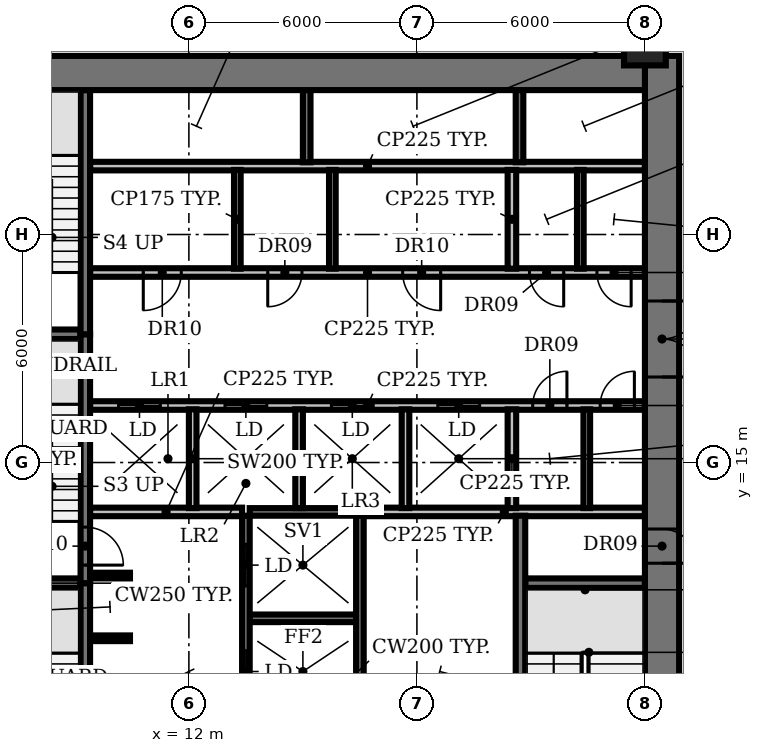
"""IFC4 building model, lengths in metres.
Left out: names, types, materials, properties, quantities, classifications, styles, units other than length and angle.
Written with IfcOpenShell. Run it as: python <this file> out.ifc"""

import sys

from ifc_helpers import new_model, si_unit, direction, frame, frame_2d, origin, origin_2d, place, context, subcontext, project, spatial, rectangle, circle, extrude, element, fill, save


model = new_model("IFC4")
c1 = context("Model", 3, precision=1e-05, world=origin(), true_north=direction((0.0, 1.0)))
c2 = subcontext(c1, "Body", "Model", "MODEL_VIEW")
j1 = project(units=[si_unit("LENGTHUNIT", "METRE"), si_unit("PLANEANGLEUNIT", "RADIAN")], contexts=[c1])
p1 = place(None, origin())
s1 = spatial("IfcSite", under=j1, at=p1, CompositionType="ELEMENT")
p2 = place(p1, origin())
s2 = spatial("IfcBuilding", under=s1, at=p2, CompositionType="ELEMENT")
p3 = place(p2, frame((0.0, 0.0, 15.5)))
s3 = spatial("IfcBuildingStorey", under=s2, at=p3, CompositionType="ELEMENT", Elevation=15.5)
p4 = place(p3, frame((24.0, 26.0, 0.0), z_axis=(0.0, 0.0, 1.0), x_axis=(1.0, 0.0, 0.0)))
e1 = element("IfcColumn", 1, at=p4, inside=s3, PredefinedType="COLUMN", context=c2, shape_type="SweptSolid", body=[
    extrude(circle(Radius=0.55, at=origin_2d()), origin(), (0.0, 0.0, 1.0), 4.15),
])
p5 = place(p3, frame((9.4, 10.375, 0.0), z_axis=(0.0, 0.0, 1.0), x_axis=(1.0, 0.0, 0.0)))
e2 = element("IfcWall", 2, at=p5, inside=s3, PredefinedType="SHEAR", context=c2, shape_type="SweptSolid", body=[
    extrude(rectangle(XDim=1.05, YDim=0.15, at=frame_2d((0.525, 0.0))), origin(), (0.0, 0.0, 1.0), 4.15),
])
p6 = place(p3, frame((13.6, 10.9, 0.0), z_axis=(0.0, 0.0, 1.0), x_axis=(1.0, 0.0, 0.0)))
e3 = element("IfcWall", 3, at=p6, inside=s3, PredefinedType="SHEAR", context=c2, shape_type="SweptSolid", body=[
    extrude(rectangle(XDim=2.8, YDim=0.2, at=frame_2d((1.4, 0.0))), origin(), (0.0, 0.0, 1.0), 4.15),
])
for number, where, z_axis, x_axis in (
    (4, (6.0, 11.825, 0.0), (0.0, 0.0, 1.0), (1.0, 0.0, 0.0)),
    (5, (20.85, 11.825, 0.0), (0.0, 0.0, 1.0), (1.0, 0.0, 0.0)),
):
    element("IfcWall", number, at=place(p3, frame(where, z_axis=z_axis, x_axis=x_axis)), inside=s3, PredefinedType="SHEAR", context=c2, shape_type="SweptSolid", body=[
        extrude(rectangle(XDim=3.15, YDim=0.25, at=frame_2d((1.575, 0.0))), origin(), (0.0, 0.0, 1.0), 4.15),
    ])
p7 = place(p3, frame((9.4, 12.025, 0.0), z_axis=(0.0, 0.0, 1.0), x_axis=(1.0, 0.0, 0.0)))
e6 = element("IfcWall", 6, at=p7, inside=s3, PredefinedType="SHEAR", context=c2, shape_type="SweptSolid", body=[
    extrude(rectangle(XDim=1.05, YDim=0.15, at=frame_2d((0.525, 0.0))), origin(), (0.0, 0.0, 1.0), 4.15),
])
p8 = place(p3, frame((9.4, 13.7, 0.0), z_axis=(0.0, 0.0, 1.0), x_axis=(1.0, 0.0, 0.0)))
e7 = element("IfcWall", 7, at=p8, inside=s3, PredefinedType="PARTITIONING", context=c2, shape_type="SweptSolid", body=[
    extrude(rectangle(XDim=4.0, YDim=0.225, at=frame_2d((2.0, 0.0))), origin(), (0.0, 0.0, 1.0), 4.15),
])
p9 = place(p3, frame((13.6, 13.7, 0.0), z_axis=(0.0, 0.0, 1.0), x_axis=(1.0, 0.0, 0.0)))
e8 = element("IfcWall", 8, at=p9, inside=s3, PredefinedType="SHEAR", context=c2, shape_type="SweptSolid", body=[
    extrude(rectangle(XDim=2.8, YDim=0.2, at=frame_2d((1.4, 0.0))), origin(), (0.0, 0.0, 1.0), 4.15),
])
p10 = place(p3, frame((16.6, 13.7, 0.0), z_axis=(0.0, 0.0, 1.0), x_axis=(1.0, 0.0, 0.0)))
e9 = element("IfcWall", 9, at=p10, inside=s3, PredefinedType="PARTITIONING", context=c2, shape_type="SweptSolid", body=[
    extrude(rectangle(XDim=7.4, YDim=0.225, at=frame_2d((3.7, 0.0))), origin(), (0.0, 0.0, 1.0), 4.15),
])
p11 = place(p3, frame((9.4, 16.5, 0.0), z_axis=(0.0, 0.0, 1.0), x_axis=(1.0, 0.0, 0.0)))
e10 = element("IfcWall", 10, at=p11, inside=s3, PredefinedType="PARTITIONING", context=c2, shape_type="SweptSolid", body=[
    extrude(rectangle(XDim=14.6, YDim=0.225, at=frame_2d((7.3, 0.0))), origin(), (0.0, 0.0, 1.0), 4.15),
])
p12 = place(p11, frame((0.75, 0.0, 0.0)))
e11 = element("IfcOpeningElement", 11, at=p12, cuts=e10, PredefinedType="OPENING", context=c2, shape_type="SweptSolid", body=[
    extrude(rectangle(XDim=1.1, YDim=2.1, at=frame_2d((0.55, 1.05))), frame((0.0, 0.123, 0.0), z_axis=(0.0, -1.0, 0.0), x_axis=(1.0, 0.0, 0.0)), (0.0, 0.0, 1.0), 0.245),
])
p13 = place(p11, frame((3.55, 0.0, 0.0)))
e12 = element("IfcOpeningElement", 12, at=p13, cuts=e10, PredefinedType="OPENING", context=c2, shape_type="SweptSolid", body=[
    extrude(rectangle(XDim=1.1, YDim=2.1, at=frame_2d((0.55, 1.05))), frame((0.0, 0.123, 0.0), z_axis=(0.0, -1.0, 0.0), x_axis=(1.0, 0.0, 0.0)), (0.0, 0.0, 1.0), 0.245),
])
p14 = place(p11, frame((6.35, 0.0, 0.0)))
e13 = element("IfcOpeningElement", 13, at=p14, cuts=e10, PredefinedType="OPENING", context=c2, shape_type="SweptSolid", body=[
    extrude(rectangle(XDim=1.1, YDim=2.1, at=frame_2d((0.55, 1.05))), frame((0.0, 0.123, 0.0), z_axis=(0.0, -1.0, 0.0), x_axis=(1.0, 0.0, 0.0)), (0.0, 0.0, 1.0), 0.245),
])
p15 = place(p11, frame((9.15, 0.0, 0.0)))
e14 = element("IfcOpeningElement", 14, at=p15, cuts=e10, PredefinedType="OPENING", context=c2, shape_type="SweptSolid", body=[
    extrude(rectangle(XDim=1.1, YDim=2.1, at=frame_2d((0.55, 1.05))), frame((0.0, 0.123, 0.0), z_axis=(0.0, -1.0, 0.0), x_axis=(1.0, 0.0, 0.0)), (0.0, 0.0, 1.0), 0.245),
])
p16 = place(p11, frame((11.647, 0.0, 0.0)))
e15 = element("IfcOpeningElement", 15, at=p16, cuts=e10, PredefinedType="OPENING", context=c2, shape_type="SweptSolid", body=[
    extrude(rectangle(XDim=0.9, YDim=2.1, at=frame_2d((0.45, 1.05))), frame((0.0, 0.123, 0.0), z_axis=(0.0, -1.0, 0.0), x_axis=(1.0, 0.0, 0.0)), (0.0, 0.0, 1.0), 0.245),
])
p17 = place(p11, frame((13.423, 0.0, 0.0)))
e16 = element("IfcOpeningElement", 16, at=p17, cuts=e10, PredefinedType="OPENING", context=c2, shape_type="SweptSolid", body=[
    extrude(rectangle(XDim=0.9, YDim=2.1, at=frame_2d((0.45, 1.05))), frame((0.0, 0.123, 0.0), z_axis=(0.0, -1.0, 0.0), x_axis=(1.0, 0.0, 0.0)), (0.0, 0.0, 1.0), 0.245),
])
p18 = place(p3, frame((6.0, 18.375, 0.0), z_axis=(0.0, 0.0, 1.0), x_axis=(1.0, 0.0, 0.0)))
e17 = element("IfcWall", 17, at=p18, inside=s3, PredefinedType="SHEAR", context=c2, shape_type="SweptSolid", body=[
    extrude(rectangle(XDim=3.15, YDim=0.25, at=frame_2d((1.575, 0.0))), origin(), (0.0, 0.0, 1.0), 4.15),
])
p19 = place(p3, frame((24.0, 20.0, 0.0), z_axis=(0.0, 0.0, 1.0), x_axis=(-1.0, 0.0, 0.0)))
e18 = element("IfcWall", 18, at=p19, inside=s3, PredefinedType="PARTITIONING", context=c2, shape_type="SweptSolid", body=[
    extrude(rectangle(XDim=14.6, YDim=0.225, at=frame_2d((7.3, 0.0))), origin(), (0.0, 0.0, 1.0), 4.15),
])
p20 = place(p19, frame((12.2, 0.0, 0.0)))
e19 = element("IfcOpeningElement", 19, at=p20, cuts=e18, PredefinedType="OPENING", context=c2, shape_type="SweptSolid", body=[
    extrude(rectangle(XDim=1.0, YDim=2.1, at=frame_2d((0.5, 1.05))), frame((0.0, 0.123, 0.0), z_axis=(0.0, -1.0, 0.0), x_axis=(1.0, 0.0, 0.0)), (0.0, 0.0, 1.0), 0.245),
])
p21 = place(p19, frame((9.025, 0.0, 0.0)))
e20 = element("IfcOpeningElement", 20, at=p21, cuts=e18, PredefinedType="OPENING", context=c2, shape_type="SweptSolid", body=[
    extrude(rectangle(XDim=0.9, YDim=2.1, at=frame_2d((0.45, 1.05))), frame((0.0, 0.123, 0.0), z_axis=(0.0, -1.0, 0.0), x_axis=(1.0, 0.0, 0.0)), (0.0, 0.0, 1.0), 0.245),
])
p22 = place(p19, frame((5.375, 0.0, 0.0)))
e21 = element("IfcOpeningElement", 21, at=p22, cuts=e18, PredefinedType="OPENING", context=c2, shape_type="SweptSolid", body=[
    extrude(rectangle(XDim=1.0, YDim=2.1, at=frame_2d((0.5, 1.05))), frame((0.0, 0.123, 0.0), z_axis=(0.0, -1.0, 0.0), x_axis=(1.0, 0.0, 0.0)), (0.0, 0.0, 1.0), 0.245),
])
p23 = place(p19, frame((2.137, 0.0, 0.0)))
e22 = element("IfcOpeningElement", 22, at=p23, cuts=e18, PredefinedType="OPENING", context=c2, shape_type="SweptSolid", body=[
    extrude(rectangle(XDim=0.9, YDim=2.1, at=frame_2d((0.45, 1.05))), frame((0.0, 0.123, 0.0), z_axis=(0.0, -1.0, 0.0), x_axis=(1.0, 0.0, 0.0)), (0.0, 0.0, 1.0), 0.245),
])
p24 = place(p19, frame((0.363, 0.0, 0.0)))
e23 = element("IfcOpeningElement", 23, at=p24, cuts=e18, PredefinedType="OPENING", context=c2, shape_type="SweptSolid", body=[
    extrude(rectangle(XDim=0.9, YDim=2.1, at=frame_2d((0.45, 1.05))), frame((0.0, 0.123, 0.0), z_axis=(0.0, -1.0, 0.0), x_axis=(1.0, 0.0, 0.0)), (0.0, 0.0, 1.0), 0.245),
])
p25 = place(p3, frame((9.4, 22.8, 0.0), z_axis=(0.0, 0.0, 1.0), x_axis=(1.0, 0.0, 0.0)))
e24 = element("IfcWall", 24, at=p25, inside=s3, PredefinedType="PARTITIONING", context=c2, shape_type="SweptSolid", body=[
    extrude(rectangle(XDim=14.6, YDim=0.225, at=frame_2d((7.3, 0.0))), origin(), (0.0, 0.0, 1.0), 4.15),
])
p26 = place(p3, frame((9.275, 11.825, 0.0), z_axis=(0.0, 0.0, 1.0), x_axis=(0.0, -1.0, 0.0)))
e25 = element("IfcWall", 25, at=p26, inside=s3, PredefinedType="SHEAR", context=c2, shape_type="SweptSolid", body=[
    extrude(rectangle(XDim=6.425, YDim=0.25, at=frame_2d((3.212, 0.0))), origin(), (0.0, 0.0, 1.0), 4.15),
])
p27 = place(p26, frame((5.075, 0.0, 0.0)))
e26 = element("IfcOpeningElement", 26, at=p27, cuts=e25, PredefinedType="OPENING", context=c2, shape_type="SweptSolid", body=[
    extrude(rectangle(XDim=1.0, YDim=2.1, at=frame_2d((0.5, 1.05))), frame((0.0, 0.135, 0.0), z_axis=(0.0, -1.0, 0.0), x_axis=(1.0, 0.0, 0.0)), (0.0, 0.0, 1.0), 0.27),
])
p28 = place(p3, frame((9.275, 18.375, 0.0), z_axis=(0.0, 0.0, 1.0), x_axis=(0.0, -1.0, 0.0)))
e27 = element("IfcWall", 27, at=p28, inside=s3, PredefinedType="SHEAR", context=c2, shape_type="SweptSolid", body=[
    extrude(rectangle(XDim=6.55, YDim=0.25, at=frame_2d((3.275, 0.0))), origin(), (0.0, 0.0, 1.0), 4.15),
])
p29 = place(p28, frame((5.075, 0.0, 0.0)))
e28 = element("IfcOpeningElement", 28, at=p29, cuts=e27, PredefinedType="OPENING", context=c2, shape_type="SweptSolid", body=[
    extrude(rectangle(XDim=1.0, YDim=2.1, at=frame_2d((0.5, 1.05))), frame((0.0, 0.135, 0.0), z_axis=(0.0, -1.0, 0.0), x_axis=(1.0, 0.0, 0.0)), (0.0, 0.0, 1.0), 0.27),
])
p30 = place(p3, frame((9.275, 18.375, 0.0), z_axis=(0.0, 0.0, 1.0), x_axis=(0.0, 1.0, 0.0)))
e29 = element("IfcWall", 29, at=p30, inside=s3, PredefinedType="SHEAR", context=c2, shape_type="SweptSolid", body=[
    extrude(rectangle(XDim=6.425, YDim=0.25, at=frame_2d((3.212, 0.0))), origin(), (0.0, 0.0, 1.0), 4.15),
])
p31 = place(p3, frame((12.1, 13.8, 0.0), z_axis=(0.0, 0.0, 1.0), x_axis=(0.0, 1.0, 0.0)))
e30 = element("IfcWall", 30, at=p31, inside=s3, PredefinedType="SOLIDWALL", context=c2, shape_type="SweptSolid", body=[
    extrude(rectangle(XDim=2.6, YDim=0.2, at=frame_2d((1.3, 0.0))), origin(), (0.0, 0.0, 1.0), 4.15),
])
p32 = place(p3, frame((13.275, 20.1, 0.0), z_axis=(0.0, 0.0, 1.0), x_axis=(0.0, 1.0, 0.0)))
e31 = element("IfcWall", 31, at=p32, inside=s3, PredefinedType="PARTITIONING", context=c2, shape_type="SweptSolid", body=[
    extrude(rectangle(XDim=2.6, YDim=0.175, at=frame_2d((1.3, 0.0))), origin(), (0.0, 0.0, 1.0), 4.15),
])
p33 = place(p3, frame((13.5, 5.4, 0.0), z_axis=(0.0, 0.0, 1.0), x_axis=(0.0, 1.0, 0.0)))
e32 = element("IfcWall", 32, at=p33, inside=s3, PredefinedType="SHEAR", context=c2, shape_type="SweptSolid", body=[
    extrude(rectangle(XDim=8.2, YDim=0.2, at=frame_2d((4.1, 0.0))), origin(), (0.0, 0.0, 1.0), 4.15),
])
p34 = place(p33, frame((0.75, 0.0, 0.0)))
e33 = element("IfcOpeningElement", 33, at=p34, cuts=e32, PredefinedType="OPENING", context=c2, shape_type="SweptSolid", body=[
    extrude(rectangle(XDim=1.1, YDim=2.1, at=frame_2d((0.55, 1.05))), frame((0.0, 0.11, 0.0), z_axis=(0.0, -1.0, 0.0), x_axis=(1.0, 0.0, 0.0)), (0.0, 0.0, 1.0), 0.22),
])
p35 = place(p33, frame((3.55, 0.0, 0.0)))
e34 = element("IfcOpeningElement", 34, at=p35, cuts=e32, PredefinedType="OPENING", context=c2, shape_type="SweptSolid", body=[
    extrude(rectangle(XDim=1.1, YDim=2.1, at=frame_2d((0.55, 1.05))), frame((0.0, 0.11, 0.0), z_axis=(0.0, -1.0, 0.0), x_axis=(1.0, 0.0, 0.0)), (0.0, 0.0, 1.0), 0.22),
])
p36 = place(p33, frame((6.35, 0.0, 0.0)))
e35 = element("IfcOpeningElement", 35, at=p36, cuts=e32, PredefinedType="OPENING", context=c2, shape_type="SweptSolid", body=[
    extrude(rectangle(XDim=1.1, YDim=2.1, at=frame_2d((0.55, 1.05))), frame((0.0, 0.11, 0.0), z_axis=(0.0, -1.0, 0.0), x_axis=(1.0, 0.0, 0.0)), (0.0, 0.0, 1.0), 0.22),
])
p37 = place(p3, frame((14.9, 13.8, 0.0), z_axis=(0.0, 0.0, 1.0), x_axis=(0.0, 1.0, 0.0)))
e36 = element("IfcWall", 36, at=p37, inside=s3, PredefinedType="SOLIDWALL", context=c2, shape_type="SweptSolid", body=[
    extrude(rectangle(XDim=2.6, YDim=0.2, at=frame_2d((1.3, 0.0))), origin(), (0.0, 0.0, 1.0), 4.15),
])
p38 = place(p3, frame((15.1, 22.9, 0.0), z_axis=(0.0, 0.0, 1.0), x_axis=(0.0, 1.0, 0.0)))
e37 = element("IfcWall", 37, at=p38, inside=s3, PredefinedType="SHEAR", context=c2, shape_type="SweptSolid", body=[
    extrude(rectangle(XDim=1.9, YDim=0.2, at=frame_2d((0.95, 0.0))), origin(), (0.0, 0.0, 1.0), 4.15),
])
p39 = place(p3, frame((15.775, 20.1, 0.0), z_axis=(0.0, 0.0, 1.0), x_axis=(0.0, 1.0, 0.0)))
e38 = element("IfcWall", 38, at=p39, inside=s3, PredefinedType="PARTITIONING", context=c2, shape_type="SweptSolid", body=[
    extrude(rectangle(XDim=2.6, YDim=0.175, at=frame_2d((1.3, 0.0))), origin(), (0.0, 0.0, 1.0), 4.15),
])
p40 = place(p3, frame((16.5, 5.4, 0.0), z_axis=(0.0, 0.0, 1.0), x_axis=(0.0, 1.0, 0.0)))
e39 = element("IfcWall", 39, at=p40, inside=s3, PredefinedType="SHEAR", context=c2, shape_type="SweptSolid", body=[
    extrude(rectangle(XDim=8.2, YDim=0.2, at=frame_2d((4.1, 0.0))), origin(), (0.0, 0.0, 1.0), 4.15),
])
p41 = place(p3, frame((17.7, 13.8, 0.0), z_axis=(0.0, 0.0, 1.0), x_axis=(0.0, 1.0, 0.0)))
e40 = element("IfcWall", 40, at=p41, inside=s3, PredefinedType="SOLIDWALL", context=c2, shape_type="SweptSolid", body=[
    extrude(rectangle(XDim=2.6, YDim=0.2, at=frame_2d((1.3, 0.0))), origin(), (0.0, 0.0, 1.0), 4.15),
])
for number, where, z_axis, x_axis in (
    (41, (20.5, 13.8, 0.0), (0.0, 0.0, 1.0), (0.0, 1.0, 0.0)),
    (42, (20.5, 20.1, 0.0), (0.0, 0.0, 1.0), (0.0, 1.0, 0.0)),
):
    element("IfcWall", number, at=place(p3, frame(where, z_axis=z_axis, x_axis=x_axis)), inside=s3, PredefinedType="PARTITIONING", context=c2, shape_type="SweptSolid", body=[
        extrude(rectangle(XDim=2.6, YDim=0.225, at=frame_2d((1.3, 0.0))), origin(), (0.0, 0.0, 1.0), 4.15),
    ])
p42 = place(p3, frame((20.7, 22.9, 0.0), z_axis=(0.0, 0.0, 1.0), x_axis=(0.0, 1.0, 0.0)))
e43 = element("IfcWall", 43, at=p42, inside=s3, PredefinedType="SHEAR", context=c2, shape_type="SweptSolid", body=[
    extrude(rectangle(XDim=1.9, YDim=0.2, at=frame_2d((0.95, 0.0))), origin(), (0.0, 0.0, 1.0), 4.15),
])
p43 = place(p3, frame((20.725, 5.4, 0.0), z_axis=(0.0, 0.0, 1.0), x_axis=(0.0, 1.0, 0.0)))
e44 = element("IfcWall", 44, at=p43, inside=s3, PredefinedType="SHEAR", context=c2, shape_type="SweptSolid", body=[
    extrude(rectangle(XDim=8.2, YDim=0.25, at=frame_2d((4.1, 0.0))), origin(), (0.0, 0.0, 1.0), 4.15),
])
for number, where, z_axis, x_axis in (
    (45, (22.3, 20.1, 0.0), (0.0, 0.0, 1.0), (0.0, 1.0, 0.0)),
    (46, (22.47, 13.8, 0.0), (0.0, 0.0, 1.0), (0.0, 1.0, 0.0)),
):
    element("IfcWall", number, at=place(p3, frame(where, z_axis=z_axis, x_axis=x_axis)), inside=s3, PredefinedType="PARTITIONING", context=c2, shape_type="SweptSolid", body=[
        extrude(rectangle(XDim=2.6, YDim=0.175, at=frame_2d((1.3, 0.0))), origin(), (0.0, 0.0, 1.0), 4.15),
    ])
p44 = place(p3, frame((24.45, 25.7, 0.0), z_axis=(0.0, 0.0, 1.0), x_axis=(0.0, -1.0, 0.0)))
e47 = element("IfcWall", 47, at=p44, inside=s3, PredefinedType="SHEAR", context=c2, shape_type="SweptSolid", body=[
    extrude(rectangle(XDim=21.2, YDim=0.9, at=frame_2d((10.6, 0.0))), origin(), (0.0, 0.0, 1.0), 4.15),
])
p45 = place(p44, frame((12.45, 0.0, 0.0)))
e48 = element("IfcOpeningElement", 48, at=p45, cuts=e47, PredefinedType="OPENING", context=c2, shape_type="SweptSolid", body=[
    extrude(rectangle(XDim=0.9, YDim=2.1, at=frame_2d((0.45, 1.05))), frame((0.0, 0.46, 0.0), z_axis=(0.0, -1.0, 0.0), x_axis=(1.0, 0.0, 0.0)), (0.0, 0.0, 1.0), 0.92),
])
p46 = place(p44, frame((6.45, 0.0, 0.0)))
e49 = element("IfcOpeningElement", 49, at=p46, cuts=e47, PredefinedType="OPENING", context=c2, shape_type="SweptSolid", body=[
    extrude(rectangle(XDim=2.0, YDim=2.1, at=frame_2d((1.0, 1.05))), frame((0.0, 0.46, 0.0), z_axis=(0.0, -1.0, 0.0), x_axis=(1.0, 0.0, 0.0)), (0.0, 0.0, 1.0), 0.92),
])
p47 = place(p3, frame((6.0, 25.25, 0.0), z_axis=(0.0, 0.0, 1.0), x_axis=(1.0, 0.0, 0.0)))
e50 = element("IfcWall", 50, at=p47, inside=s3, PredefinedType="SHEAR", context=c2, shape_type="SweptSolid", body=[
    extrude(rectangle(XDim=18.0, YDim=0.9, at=frame_2d((9.0, 0.0))), origin(), (0.0, 0.0, 1.0), 4.15),
])
p48 = place(p12, origin())
e51 = element("IfcDoor", 51, at=p48, inside=s3, OperationType="DOUBLE_DOOR_SLIDING", PredefinedType="DOOR", context=c2, shape_type="SweptSolid", body=[
    extrude(rectangle(XDim=1.1, YDim=2.1, at=frame_2d((0.55, 1.05))), frame((0.0, 0.025, 0.0), z_axis=(0.0, -1.0, 0.0), x_axis=(1.0, 0.0, 0.0)), (0.0, 0.0, 1.0), 0.05),
])
fill(e11, e51)
p49 = place(p13, origin())
e52 = element("IfcDoor", 52, at=p49, inside=s3, OperationType="DOUBLE_DOOR_SLIDING", PredefinedType="DOOR", context=c2, shape_type="SweptSolid", body=[
    extrude(rectangle(XDim=1.1, YDim=2.1, at=frame_2d((0.55, 1.05))), frame((0.0, 0.025, 0.0), z_axis=(0.0, -1.0, 0.0), x_axis=(1.0, 0.0, 0.0)), (0.0, 0.0, 1.0), 0.05),
])
fill(e12, e52)
p50 = place(p14, origin())
e53 = element("IfcDoor", 53, at=p50, inside=s3, OperationType="DOUBLE_DOOR_SLIDING", PredefinedType="DOOR", context=c2, shape_type="SweptSolid", body=[
    extrude(rectangle(XDim=1.1, YDim=2.1, at=frame_2d((0.55, 1.05))), frame((0.0, 0.025, 0.0), z_axis=(0.0, -1.0, 0.0), x_axis=(1.0, 0.0, 0.0)), (0.0, 0.0, 1.0), 0.05),
])
fill(e13, e53)
p51 = place(p15, origin())
e54 = element("IfcDoor", 54, at=p51, inside=s3, OperationType="DOUBLE_DOOR_SLIDING", PredefinedType="DOOR", context=c2, shape_type="SweptSolid", body=[
    extrude(rectangle(XDim=1.1, YDim=2.1, at=frame_2d((0.55, 1.05))), frame((0.0, 0.025, 0.0), z_axis=(0.0, -1.0, 0.0), x_axis=(1.0, 0.0, 0.0)), (0.0, 0.0, 1.0), 0.05),
])
fill(e14, e54)
p52 = place(p16, origin())
e55 = element("IfcDoor", 55, at=p52, inside=s3, OperationType="SINGLE_SWING_RIGHT", PredefinedType="DOOR", context=c2, shape_type="SweptSolid", body=[
    extrude(rectangle(XDim=0.9, YDim=2.1, at=frame_2d((0.45, 1.05))), frame((0.0, 0.025, 0.0), z_axis=(0.0, -1.0, 0.0), x_axis=(1.0, 0.0, 0.0)), (0.0, 0.0, 1.0), 0.05),
])
fill(e15, e55)
p53 = place(p17, origin())
e56 = element("IfcDoor", 56, at=p53, inside=s3, OperationType="SINGLE_SWING_RIGHT", PredefinedType="DOOR", context=c2, shape_type="SweptSolid", body=[
    extrude(rectangle(XDim=0.9, YDim=2.1, at=frame_2d((0.45, 1.05))), frame((0.0, 0.025, 0.0), z_axis=(0.0, -1.0, 0.0), x_axis=(1.0, 0.0, 0.0)), (0.0, 0.0, 1.0), 0.05),
])
fill(e16, e56)
p54 = place(p20, origin())
e57 = element("IfcDoor", 57, at=p54, inside=s3, OperationType="SINGLE_SWING_RIGHT", PredefinedType="DOOR", context=c2, shape_type="SweptSolid", body=[
    extrude(rectangle(XDim=1.0, YDim=2.1, at=frame_2d((0.5, 1.05))), frame((0.0, 0.025, 0.0), z_axis=(0.0, -1.0, 0.0), x_axis=(1.0, 0.0, 0.0)), (0.0, 0.0, 1.0), 0.05),
])
fill(e19, e57)
p55 = place(p21, origin())
e58 = element("IfcDoor", 58, at=p55, inside=s3, OperationType="SINGLE_SWING_RIGHT", PredefinedType="DOOR", context=c2, shape_type="SweptSolid", body=[
    extrude(rectangle(XDim=0.9, YDim=2.1, at=frame_2d((0.45, 1.05))), frame((0.0, 0.025, 0.0), z_axis=(0.0, -1.0, 0.0), x_axis=(1.0, 0.0, 0.0)), (0.0, 0.0, 1.0), 0.05),
])
fill(e20, e58)
p56 = place(p22, origin())
e59 = element("IfcDoor", 59, at=p56, inside=s3, OperationType="SINGLE_SWING_LEFT", PredefinedType="DOOR", context=c2, shape_type="SweptSolid", body=[
    extrude(rectangle(XDim=1.0, YDim=2.1, at=frame_2d((0.5, 1.05))), frame((0.0, 0.025, 0.0), z_axis=(0.0, -1.0, 0.0), x_axis=(1.0, 0.0, 0.0)), (0.0, 0.0, 1.0), 0.05),
])
fill(e21, e59)
p57 = place(p23, origin())
e60 = element("IfcDoor", 60, at=p57, inside=s3, OperationType="SINGLE_SWING_LEFT", PredefinedType="DOOR", context=c2, shape_type="SweptSolid", body=[
    extrude(rectangle(XDim=0.9, YDim=2.1, at=frame_2d((0.45, 1.05))), frame((0.0, 0.025, 0.0), z_axis=(0.0, -1.0, 0.0), x_axis=(1.0, 0.0, 0.0)), (0.0, 0.0, 1.0), 0.05),
])
fill(e22, e60)
p58 = place(p24, origin())
e61 = element("IfcDoor", 61, at=p58, inside=s3, OperationType="SINGLE_SWING_LEFT", PredefinedType="DOOR", context=c2, shape_type="SweptSolid", body=[
    extrude(rectangle(XDim=0.9, YDim=2.1, at=frame_2d((0.45, 1.05))), frame((0.0, 0.025, 0.0), z_axis=(0.0, -1.0, 0.0), x_axis=(1.0, 0.0, 0.0)), (0.0, 0.0, 1.0), 0.05),
])
fill(e23, e61)
p59 = place(p29, origin())
e62 = element("IfcDoor", 62, at=p59, inside=s3, OperationType="SINGLE_SWING_RIGHT", PredefinedType="DOOR", context=c2, shape_type="SweptSolid", body=[
    extrude(rectangle(XDim=1.0, YDim=2.1, at=frame_2d((0.5, 1.05))), frame((0.0, 0.025, 0.0), z_axis=(0.0, -1.0, 0.0), x_axis=(1.0, 0.0, 0.0)), (0.0, 0.0, 1.0), 0.05),
])
fill(e28, e62)
p60 = place(p35, origin())
e63 = element("IfcDoor", 63, at=p60, inside=s3, OperationType="DOUBLE_DOOR_SLIDING", PredefinedType="DOOR", context=c2, shape_type="SweptSolid", body=[
    extrude(rectangle(XDim=1.1, YDim=2.1, at=frame_2d((0.55, 1.05))), frame((0.0, 0.025, 0.0), z_axis=(0.0, -1.0, 0.0), x_axis=(1.0, 0.0, 0.0)), (0.0, 0.0, 1.0), 0.05),
])
fill(e34, e63)
p61 = place(p36, origin())
e64 = element("IfcDoor", 64, at=p61, inside=s3, OperationType="DOUBLE_DOOR_SLIDING", PredefinedType="DOOR", context=c2, shape_type="SweptSolid", body=[
    extrude(rectangle(XDim=1.1, YDim=2.1, at=frame_2d((0.55, 1.05))), frame((0.0, 0.025, 0.0), z_axis=(0.0, -1.0, 0.0), x_axis=(1.0, 0.0, 0.0)), (0.0, 0.0, 1.0), 0.05),
])
fill(e35, e64)
p62 = place(p45, origin())
e65 = element("IfcDoor", 65, at=p62, inside=s3, OperationType="SINGLE_SWING_RIGHT", PredefinedType="DOOR", context=c2, shape_type="SweptSolid", body=[
    extrude(rectangle(XDim=0.9, YDim=2.1, at=frame_2d((0.45, 1.05))), frame((0.0, -0.39, 0.0), z_axis=(0.0, -1.0, 0.0), x_axis=(1.0, 0.0, 0.0)), (0.0, 0.0, 1.0), 0.05),
])
fill(e48, e65)
p63 = place(p46, origin())
e66 = element("IfcDoor", 66, at=p63, inside=s3, OperationType="DOUBLE_DOOR_SINGLE_SWING", PredefinedType="DOOR", context=c2, shape_type="SweptSolid", body=[
    extrude(rectangle(XDim=2.0, YDim=2.1, at=frame_2d((1.0, 1.05))), frame((0.0, 0.025, 0.0), z_axis=(0.0, -1.0, 0.0), x_axis=(1.0, 0.0, 0.0)), (0.0, 0.0, 1.0), 0.05),
])
fill(e49, e66)
save(model, sys.argv[1])
